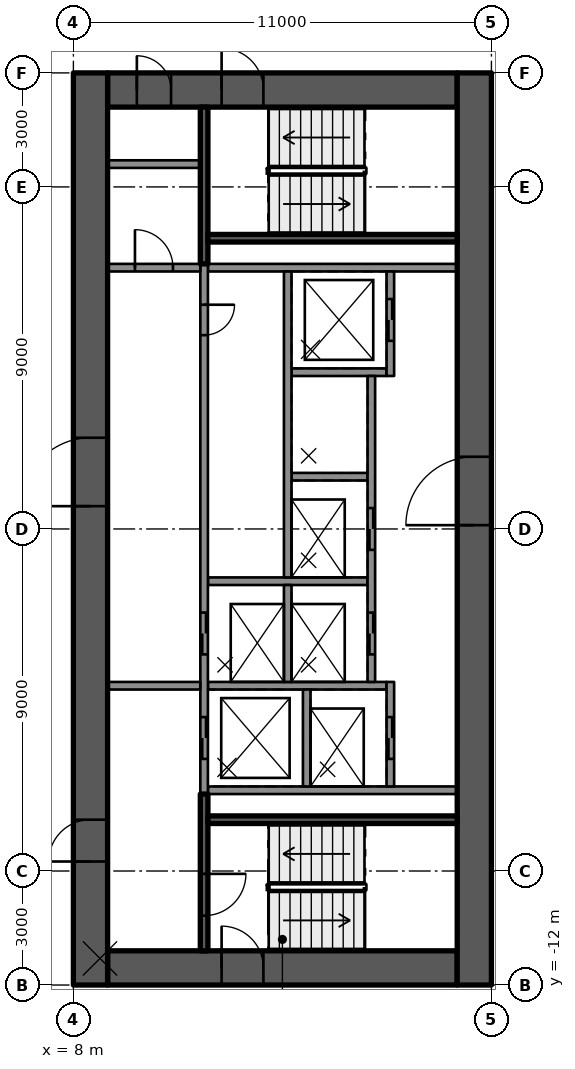
"""IFC4 building model, lengths in metres.
Left out: names, types, materials, properties, quantities, classifications, styles, units other than length and angle.
Written with IfcOpenShell. Run it as: python <this file> out.ifc"""

import sys

from ifc_helpers import new_model, si_unit, direction, frame, frame_2d, origin, place, context, subcontext, project, spatial, rectangle, extrude, element, fill, save


model = new_model("IFC4")
c1 = context("Model", 3, precision=1e-05, world=origin(), true_north=direction((0.0, 1.0)))
c2 = subcontext(c1, "Body", "Model", "MODEL_VIEW")
j1 = project(units=[si_unit("LENGTHUNIT", "METRE"), si_unit("PLANEANGLEUNIT", "RADIAN")], contexts=[c1])
p1 = place(None, origin())
s1 = spatial("IfcSite", under=j1, at=p1, CompositionType="ELEMENT")
p2 = place(p1, origin())
s2 = spatial("IfcBuilding", under=s1, at=p2, CompositionType="ELEMENT")
p3 = place(p2, frame((0.0, 0.0, 152.6)))
s3 = spatial("IfcBuildingStorey", under=s2, at=p3, CompositionType="ELEMENT", Elevation=152.6)
p4 = place(p3, frame((8.9, 11.55, 0.0), z_axis=(0.0, 0.0, 1.0), x_axis=(1.0, 0.0, 0.0)))
e1 = element("IfcWall", 1, at=p4, inside=s3, PredefinedType="SHEAR", context=c2, shape_type="SweptSolid", body=[
    extrude(rectangle(XDim=9.2, YDim=0.9, at=frame_2d((4.6, 0.0))), origin(), (0.0, 0.0, 1.0), 3.5),
])
p5 = place(p4, frame((3.0, 0.0, 0.0)))
e2 = element("IfcOpeningElement", 2, at=p5, cuts=e1, PredefinedType="OPENING", context=c2, shape_type="SweptSolid", body=[
    extrude(rectangle(XDim=1.1, YDim=2.1, at=frame_2d((0.55, 1.05))), frame((0.0, 0.46, 0.0), z_axis=(0.0, -1.0, 0.0), x_axis=(1.0, 0.0, 0.0)), (0.0, 0.0, 1.0), 0.92),
])
p6 = place(p4, frame((0.77, 0.0, 0.0)))
e3 = element("IfcOpeningElement", 3, at=p6, cuts=e1, PredefinedType="OPENING", context=c2, shape_type="SweptSolid", body=[
    extrude(rectangle(XDim=0.9, YDim=2.1, at=frame_2d((0.45, 1.05))), frame((0.0, 0.46, 0.0), z_axis=(0.0, -1.0, 0.0), x_axis=(1.0, 0.0, 0.0)), (0.0, 0.0, 1.0), 0.92),
])
p7 = place(p3, frame((8.9, -11.55, 0.0), z_axis=(0.0, 0.0, 1.0), x_axis=(1.0, 0.0, 0.0)))
e4 = element("IfcWall", 4, at=p7, inside=s3, PredefinedType="SHEAR", context=c2, shape_type="SweptSolid", body=[
    extrude(rectangle(XDim=9.2, YDim=0.9, at=frame_2d((4.6, 0.0))), origin(), (0.0, 0.0, 1.0), 3.5),
])
p8 = place(p7, frame((3.0, 0.0, 0.0)))
e5 = element("IfcOpeningElement", 5, at=p8, cuts=e4, PredefinedType="OPENING", context=c2, shape_type="SweptSolid", body=[
    extrude(rectangle(XDim=1.1, YDim=2.1, at=frame_2d((0.55, 1.05))), frame((0.0, 0.46, 0.0), z_axis=(0.0, -1.0, 0.0), x_axis=(1.0, 0.0, 0.0)), (0.0, 0.0, 1.0), 0.92),
])
p9 = place(p3, frame((8.45, -12.0, 0.0), z_axis=(0.0, 0.0, 1.0), x_axis=(0.0, 1.0, 0.0)))
e6 = element("IfcWall", 6, at=p9, inside=s3, PredefinedType="SHEAR", context=c2, shape_type="SweptSolid", body=[
    extrude(rectangle(XDim=24.0, YDim=0.9, at=frame_2d((12.0, 0.0))), origin(), (0.0, 0.0, 1.0), 3.5),
])
p10 = place(p9, frame((12.6, 0.0, 0.0)))
e7 = element("IfcOpeningElement", 7, at=p10, cuts=e6, PredefinedType="OPENING", context=c2, shape_type="SweptSolid", body=[
    extrude(rectangle(XDim=1.8, YDim=2.1, at=frame_2d((0.9, 1.05))), frame((0.0, 0.46, 0.0), z_axis=(0.0, -1.0, 0.0), x_axis=(1.0, 0.0, 0.0)), (0.0, 0.0, 1.0), 0.92),
])
p11 = place(p9, frame((3.25, 0.0, 0.0)))
e8 = element("IfcOpeningElement", 8, at=p11, cuts=e6, PredefinedType="OPENING", context=c2, shape_type="SweptSolid", body=[
    extrude(rectangle(XDim=1.1, YDim=2.1, at=frame_2d((0.55, 1.05))), frame((0.0, 0.46, 0.0), z_axis=(0.0, -1.0, 0.0), x_axis=(1.0, 0.0, 0.0)), (0.0, 0.0, 1.0), 0.92),
])
p12 = place(p3, frame((18.55, -12.0, 0.0), z_axis=(0.0, 0.0, 1.0), x_axis=(0.0, 1.0, 0.0)))
e9 = element("IfcWall", 9, at=p12, inside=s3, PredefinedType="SHEAR", context=c2, shape_type="SweptSolid", body=[
    extrude(rectangle(XDim=24.0, YDim=0.9, at=frame_2d((12.0, 0.0))), origin(), (0.0, 0.0, 1.0), 3.5),
])
p13 = place(p12, frame((12.1, 0.0, 0.0)))
e10 = element("IfcOpeningElement", 10, at=p13, cuts=e9, PredefinedType="OPENING", context=c2, shape_type="SweptSolid", body=[
    extrude(rectangle(XDim=1.8, YDim=2.1, at=frame_2d((0.9, 1.05))), frame((0.0, 0.46, 0.0), z_axis=(0.0, -1.0, 0.0), x_axis=(1.0, 0.0, 0.0)), (0.0, 0.0, 1.0), 0.92),
])
for number, where, z_axis, x_axis in (
    (11, (11.54, -6.875, 0.0), (0.0, 0.0, 1.0), (1.0, 0.0, 0.0)),
    (12, (11.54, 6.875, 0.0), (0.0, 0.0, 1.0), (1.0, 0.0, 0.0)),
):
    element("IfcWall", number, at=place(p3, frame(where, z_axis=z_axis, x_axis=x_axis)), inside=s3, PredefinedType="SOLIDWALL", context=c2, shape_type="SweptSolid", body=[
        extrude(rectangle(XDim=6.56, YDim=0.2, at=frame_2d((3.28, 0.0))), origin(), (0.0, 0.0, 1.0), 3.09),
    ])
p14 = place(p3, frame((13.74, 4.125, 0.0), z_axis=(0.0, 0.0, 1.0), x_axis=(1.0, 0.0, 0.0)))
e13 = element("IfcWall", 13, at=p14, inside=s3, PredefinedType="SOLIDWALL", context=c2, shape_type="SweptSolid", body=[
    extrude(rectangle(XDim=2.5, YDim=0.2, at=frame_2d((1.25, 0.0))), origin(), (0.0, 0.0, 1.0), 3.09),
])
p15 = place(p3, frame((13.74, 1.375, 0.0), z_axis=(0.0, 0.0, 1.0), x_axis=(1.0, 0.0, 0.0)))
e14 = element("IfcWall", 14, at=p15, inside=s3, PredefinedType="SOLIDWALL", context=c2, shape_type="SweptSolid", body=[
    extrude(rectangle(XDim=2.0, YDim=0.2, at=frame_2d((1.0, 0.0))), origin(), (0.0, 0.0, 1.0), 3.09),
])
p16 = place(p3, frame((11.54, -1.375, 0.0), z_axis=(0.0, 0.0, 1.0), x_axis=(1.0, 0.0, 0.0)))
e15 = element("IfcWall", 15, at=p16, inside=s3, PredefinedType="SOLIDWALL", context=c2, shape_type="SweptSolid", body=[
    extrude(rectangle(XDim=4.2, YDim=0.2, at=frame_2d((2.1, 0.0))), origin(), (0.0, 0.0, 1.0), 3.09),
])
p17 = place(p3, frame((11.54, -4.125, 0.0), z_axis=(0.0, 0.0, 1.0), x_axis=(1.0, 0.0, 0.0)))
e16 = element("IfcWall", 16, at=p17, inside=s3, PredefinedType="SOLIDWALL", context=c2, shape_type="SweptSolid", body=[
    extrude(rectangle(XDim=4.7, YDim=0.2, at=frame_2d((2.35, 0.0))), origin(), (0.0, 0.0, 1.0), 3.09),
])
p18 = place(p3, frame((11.44, 6.975, 0.0), z_axis=(0.0, 0.0, 1.0), x_axis=(0.0, -1.0, 0.0)))
e17 = element("IfcWall", 17, at=p18, inside=s3, PredefinedType="SOLIDWALL", context=c2, shape_type="SweptSolid", body=[
    extrude(rectangle(XDim=13.95, YDim=0.2, at=frame_2d((6.975, 0.0))), origin(), (0.0, 0.0, 1.0), 3.09),
])
p19 = place(p18, frame((9.175, 0.0, 0.0)))
e18 = element("IfcOpeningElement", 18, at=p19, cuts=e17, PredefinedType="OPENING", context=c2, shape_type="SweptSolid", body=[
    extrude(rectangle(XDim=1.1, YDim=2.1, at=frame_2d((0.55, 1.05))), frame((0.0, 0.11, 0.0), z_axis=(0.0, -1.0, 0.0), x_axis=(1.0, 0.0, 0.0)), (0.0, 0.0, 1.0), 0.22),
])
p20 = place(p18, frame((11.925, 0.0, 0.0)))
e19 = element("IfcOpeningElement", 19, at=p20, cuts=e17, PredefinedType="OPENING", context=c2, shape_type="SweptSolid", body=[
    extrude(rectangle(XDim=1.1, YDim=2.1, at=frame_2d((0.55, 1.05))), frame((0.0, 0.11, 0.0), z_axis=(0.0, -1.0, 0.0), x_axis=(1.0, 0.0, 0.0)), (0.0, 0.0, 1.0), 0.22),
])
p21 = place(p18, frame((1.075, 0.0, 0.0)))
e20 = element("IfcOpeningElement", 20, at=p21, cuts=e17, PredefinedType="OPENING", context=c2, shape_type="SweptSolid", body=[
    extrude(rectangle(XDim=0.8, YDim=2.1, at=frame_2d((0.4, 1.05))), frame((0.0, 0.11, 0.0), z_axis=(0.0, -1.0, 0.0), x_axis=(1.0, 0.0, 0.0)), (0.0, 0.0, 1.0), 0.22),
])
p22 = place(p3, frame((13.64, 6.775, 0.0), z_axis=(0.0, 0.0, 1.0), x_axis=(0.0, -1.0, 0.0)))
e21 = element("IfcWall", 21, at=p22, inside=s3, PredefinedType="SOLIDWALL", context=c2, shape_type="SweptSolid", body=[
    extrude(rectangle(XDim=8.05, YDim=0.2, at=frame_2d((4.025, 0.0))), origin(), (0.0, 0.0, 1.0), 3.09),
])
for number, where, z_axis, x_axis in (
    (22, (13.64, -1.475, 0.0), (0.0, 0.0, 1.0), (0.0, -1.0, 0.0)),
    (23, (14.14, -4.225, 0.0), (0.0, 0.0, 1.0), (0.0, -1.0, 0.0)),
):
    element("IfcWall", number, at=place(p3, frame(where, z_axis=z_axis, x_axis=x_axis)), inside=s3, PredefinedType="SOLIDWALL", context=c2, shape_type="SweptSolid", body=[
        extrude(rectangle(XDim=2.55, YDim=0.2, at=frame_2d((1.275, 0.0))), origin(), (0.0, 0.0, 1.0), 3.09),
    ])
p23 = place(p3, frame((16.34, 6.775, 0.0), z_axis=(0.0, 0.0, 1.0), x_axis=(0.0, -1.0, 0.0)))
e24 = element("IfcWall", 24, at=p23, inside=s3, PredefinedType="SOLIDWALL", context=c2, shape_type="SweptSolid", body=[
    extrude(rectangle(XDim=2.75, YDim=0.2, at=frame_2d((1.375, 0.0))), origin(), (0.0, 0.0, 1.0), 3.09),
])
p24 = place(p23, frame((0.725, 0.0, 0.0)))
e25 = element("IfcOpeningElement", 25, at=p24, cuts=e24, PredefinedType="OPENING", context=c2, shape_type="SweptSolid", body=[
    extrude(rectangle(XDim=1.1, YDim=2.1, at=frame_2d((0.55, 1.05))), frame((0.0, 0.11, 0.0), z_axis=(0.0, -1.0, 0.0), x_axis=(1.0, 0.0, 0.0)), (0.0, 0.0, 1.0), 0.22),
])
p25 = place(p3, frame((15.84, 4.025, 0.0), z_axis=(0.0, 0.0, 1.0), x_axis=(0.0, -1.0, 0.0)))
e26 = element("IfcWall", 26, at=p25, inside=s3, PredefinedType="SOLIDWALL", context=c2, shape_type="SweptSolid", body=[
    extrude(rectangle(XDim=8.05, YDim=0.2, at=frame_2d((4.025, 0.0))), origin(), (0.0, 0.0, 1.0), 3.09),
])
p26 = place(p25, frame((3.475, 0.0, 0.0)))
e27 = element("IfcOpeningElement", 27, at=p26, cuts=e26, PredefinedType="OPENING", context=c2, shape_type="SweptSolid", body=[
    extrude(rectangle(XDim=1.1, YDim=2.1, at=frame_2d((0.55, 1.05))), frame((0.0, 0.11, 0.0), z_axis=(0.0, -1.0, 0.0), x_axis=(1.0, 0.0, 0.0)), (0.0, 0.0, 1.0), 0.22),
])
p27 = place(p25, frame((6.225, 0.0, 0.0)))
e28 = element("IfcOpeningElement", 28, at=p27, cuts=e26, PredefinedType="OPENING", context=c2, shape_type="SweptSolid", body=[
    extrude(rectangle(XDim=1.1, YDim=2.1, at=frame_2d((0.55, 1.05))), frame((0.0, 0.11, 0.0), z_axis=(0.0, -1.0, 0.0), x_axis=(1.0, 0.0, 0.0)), (0.0, 0.0, 1.0), 0.22),
])
p28 = place(p3, frame((16.34, -4.025, 0.0), z_axis=(0.0, 0.0, 1.0), x_axis=(0.0, -1.0, 0.0)))
e29 = element("IfcWall", 29, at=p28, inside=s3, PredefinedType="SOLIDWALL", context=c2, shape_type="SweptSolid", body=[
    extrude(rectangle(XDim=2.75, YDim=0.2, at=frame_2d((1.375, 0.0))), origin(), (0.0, 0.0, 1.0), 3.09),
])
p29 = place(p28, frame((0.925, 0.0, 0.0)))
e30 = element("IfcOpeningElement", 30, at=p29, cuts=e29, PredefinedType="OPENING", context=c2, shape_type="SweptSolid", body=[
    extrude(rectangle(XDim=1.1, YDim=2.1, at=frame_2d((0.55, 1.05))), frame((0.0, 0.11, 0.0), z_axis=(0.0, -1.0, 0.0), x_axis=(1.0, 0.0, 0.0)), (0.0, 0.0, 1.0), 0.22),
])
p30 = place(p3, frame((11.44, -6.975, 0.0), z_axis=(0.0, 0.0, 1.0), x_axis=(0.0, -1.0, 0.0)))
e31 = element("IfcWall", 31, at=p30, inside=s3, PredefinedType="SOLIDWALL", context=c2, shape_type="SweptSolid", body=[
    extrude(rectangle(XDim=4.125, YDim=0.2, at=frame_2d((2.062, 0.0))), origin(), (0.0, 0.0, 1.0), 3.09),
])
p31 = place(p30, frame((2.1, 0.0, 0.0)))
e32 = element("IfcOpeningElement", 32, at=p31, cuts=e31, PredefinedType="OPENING", context=c2, shape_type="SweptSolid", body=[
    extrude(rectangle(XDim=1.1, YDim=2.1, at=frame_2d((0.55, 1.05))), frame((0.0, 0.11, 0.0), z_axis=(0.0, -1.0, 0.0), x_axis=(1.0, 0.0, 0.0)), (0.0, 0.0, 1.0), 0.22),
])
p32 = place(p3, frame((11.54, -7.65, 0.0), z_axis=(0.0, 0.0, 1.0), x_axis=(1.0, 0.0, 0.0)))
e33 = element("IfcWall", 33, at=p32, inside=s3, PredefinedType="SOLIDWALL", context=c2, shape_type="SweptSolid", body=[
    extrude(rectangle(XDim=6.56, YDim=0.2, at=frame_2d((3.28, 0.0))), origin(), (0.0, 0.0, 1.0), 3.09),
])
p33 = place(p3, frame((11.44, 11.1, 0.0), z_axis=(0.0, 0.0, 1.0), x_axis=(0.0, -1.0, 0.0)))
e34 = element("IfcWall", 34, at=p33, inside=s3, PredefinedType="SOLIDWALL", context=c2, shape_type="SweptSolid", body=[
    extrude(rectangle(XDim=4.125, YDim=0.2, at=frame_2d((2.062, 0.0))), origin(), (0.0, 0.0, 1.0), 3.09),
])
p34 = place(p3, frame((11.54, 7.65, 0.0), z_axis=(0.0, 0.0, 1.0), x_axis=(1.0, 0.0, 0.0)))
e35 = element("IfcWall", 35, at=p34, inside=s3, PredefinedType="SOLIDWALL", context=c2, shape_type="SweptSolid", body=[
    extrude(rectangle(XDim=6.56, YDim=0.2, at=frame_2d((3.28, 0.0))), origin(), (0.0, 0.0, 1.0), 3.09),
])
p35 = place(p3, frame((8.9, -4.125, 0.0), z_axis=(0.0, 0.0, 1.0), x_axis=(1.0, 0.0, 0.0)))
e36 = element("IfcWall", 36, at=p35, inside=s3, PredefinedType="PARTITIONING", context=c2, shape_type="SweptSolid", body=[
    extrude(rectangle(XDim=2.44, YDim=0.2, at=frame_2d((1.22, 0.0))), origin(), (0.0, 0.0, 1.0), 3.09),
])
p36 = place(p3, frame((8.9, 6.875, 0.0), z_axis=(0.0, 0.0, 1.0), x_axis=(1.0, 0.0, 0.0)))
e37 = element("IfcWall", 37, at=p36, inside=s3, PredefinedType="PARTITIONING", context=c2, shape_type="SweptSolid", body=[
    extrude(rectangle(XDim=2.44, YDim=0.2, at=frame_2d((1.22, 0.0))), origin(), (0.0, 0.0, 1.0), 3.09),
])
p37 = place(p36, frame((0.72, 0.0, 0.0)))
e38 = element("IfcOpeningElement", 38, at=p37, cuts=e37, PredefinedType="OPENING", context=c2, shape_type="SweptSolid", body=[
    extrude(rectangle(XDim=1.0, YDim=2.1, at=frame_2d((0.5, 1.05))), frame((0.0, 0.11, 0.0), z_axis=(0.0, -1.0, 0.0), x_axis=(1.0, 0.0, 0.0)), (0.0, 0.0, 1.0), 0.22),
])
p38 = place(p3, frame((8.9, 9.6, 0.0), z_axis=(0.0, 0.0, 1.0), x_axis=(1.0, 0.0, 0.0)))
e39 = element("IfcWall", 39, at=p38, inside=s3, PredefinedType="PARTITIONING", context=c2, shape_type="SweptSolid", body=[
    extrude(rectangle(XDim=2.44, YDim=0.2, at=frame_2d((1.22, 0.0))), origin(), (0.0, 0.0, 1.0), 3.09),
])
p39 = place(p24, origin())
e40 = element("IfcDoor", 40, at=p39, inside=s3, OperationType="DOUBLE_DOOR_SLIDING", PredefinedType="DOOR", context=c2, shape_type="SweptSolid", body=[
    extrude(rectangle(XDim=1.1, YDim=2.1, at=frame_2d((0.55, 1.05))), frame((0.0, 0.025, 0.0), z_axis=(0.0, -1.0, 0.0), x_axis=(1.0, 0.0, 0.0)), (0.0, 0.0, 1.0), 0.05),
])
fill(e25, e40)
p40 = place(p26, origin())
e41 = element("IfcDoor", 41, at=p40, inside=s3, OperationType="DOUBLE_DOOR_SLIDING", PredefinedType="DOOR", context=c2, shape_type="SweptSolid", body=[
    extrude(rectangle(XDim=1.1, YDim=2.1, at=frame_2d((0.55, 1.05))), frame((0.0, 0.025, 0.0), z_axis=(0.0, -1.0, 0.0), x_axis=(1.0, 0.0, 0.0)), (0.0, 0.0, 1.0), 0.05),
])
fill(e27, e41)
p41 = place(p19, origin())
e42 = element("IfcDoor", 42, at=p41, inside=s3, OperationType="DOUBLE_DOOR_SLIDING", PredefinedType="DOOR", context=c2, shape_type="SweptSolid", body=[
    extrude(rectangle(XDim=1.1, YDim=2.1, at=frame_2d((0.55, 1.05))), frame((0.0, 0.025, 0.0), z_axis=(0.0, -1.0, 0.0), x_axis=(1.0, 0.0, 0.0)), (0.0, 0.0, 1.0), 0.05),
])
fill(e18, e42)
p42 = place(p27, origin())
e43 = element("IfcDoor", 43, at=p42, inside=s3, OperationType="DOUBLE_DOOR_SLIDING", PredefinedType="DOOR", context=c2, shape_type="SweptSolid", body=[
    extrude(rectangle(XDim=1.1, YDim=2.1, at=frame_2d((0.55, 1.05))), frame((0.0, 0.025, 0.0), z_axis=(0.0, -1.0, 0.0), x_axis=(1.0, 0.0, 0.0)), (0.0, 0.0, 1.0), 0.05),
])
fill(e28, e43)
p43 = place(p20, origin())
e44 = element("IfcDoor", 44, at=p43, inside=s3, OperationType="DOUBLE_DOOR_SLIDING", PredefinedType="DOOR", context=c2, shape_type="SweptSolid", body=[
    extrude(rectangle(XDim=1.1, YDim=2.1, at=frame_2d((0.55, 1.05))), frame((0.0, 0.025, 0.0), z_axis=(0.0, -1.0, 0.0), x_axis=(1.0, 0.0, 0.0)), (0.0, 0.0, 1.0), 0.05),
])
fill(e19, e44)
p44 = place(p29, origin())
e45 = element("IfcDoor", 45, at=p44, inside=s3, OperationType="DOUBLE_DOOR_SLIDING", PredefinedType="DOOR", context=c2, shape_type="SweptSolid", body=[
    extrude(rectangle(XDim=1.1, YDim=2.1, at=frame_2d((0.55, 1.05))), frame((0.0, 0.025, 0.0), z_axis=(0.0, -1.0, 0.0), x_axis=(1.0, 0.0, 0.0)), (0.0, 0.0, 1.0), 0.05),
])
fill(e30, e45)
p45 = place(p21, origin())
e46 = element("IfcDoor", 46, at=p45, inside=s3, OperationType="SINGLE_SWING_LEFT", PredefinedType="DOOR", context=c2, shape_type="SweptSolid", body=[
    extrude(rectangle(XDim=0.8, YDim=2.1, at=frame_2d((0.4, 1.05))), frame((0.0, 0.025, 0.0), z_axis=(0.0, -1.0, 0.0), x_axis=(1.0, 0.0, 0.0)), (0.0, 0.0, 1.0), 0.05),
])
fill(e20, e46)
p46 = place(p10, origin())
e47 = element("IfcDoor", 47, at=p46, inside=s3, OperationType="SINGLE_SWING_RIGHT", PredefinedType="DOOR", context=c2, shape_type="SweptSolid", body=[
    extrude(rectangle(XDim=1.8, YDim=2.1, at=frame_2d((0.9, 1.05))), frame((0.0, 0.025, 0.0), z_axis=(0.0, -1.0, 0.0), x_axis=(1.0, 0.0, 0.0)), (0.0, 0.0, 1.0), 0.05),
])
fill(e7, e47)
p47 = place(p13, origin())
e48 = element("IfcDoor", 48, at=p47, inside=s3, OperationType="SINGLE_SWING_RIGHT", PredefinedType="DOOR", context=c2, shape_type="SweptSolid", body=[
    extrude(rectangle(XDim=1.8, YDim=2.1, at=frame_2d((0.9, 1.05))), frame((0.0, 0.025, 0.0), z_axis=(0.0, -1.0, 0.0), x_axis=(1.0, 0.0, 0.0)), (0.0, 0.0, 1.0), 0.05),
])
fill(e10, e48)
p48 = place(p11, origin())
e49 = element("IfcDoor", 49, at=p48, inside=s3, OperationType="SINGLE_SWING_LEFT", PredefinedType="DOOR", context=c2, shape_type="SweptSolid", body=[
    extrude(rectangle(XDim=1.1, YDim=2.1, at=frame_2d((0.55, 1.05))), frame((0.0, 0.025, 0.0), z_axis=(0.0, -1.0, 0.0), x_axis=(1.0, 0.0, 0.0)), (0.0, 0.0, 1.0), 0.05),
])
fill(e8, e49)
p49 = place(p8, origin())
e50 = element("IfcDoor", 50, at=p49, inside=s3, OperationType="SINGLE_SWING_LEFT", PredefinedType="DOOR", context=c2, shape_type="SweptSolid", body=[
    extrude(rectangle(XDim=1.1, YDim=2.1, at=frame_2d((0.55, 1.05))), frame((0.0, 0.025, 0.0), z_axis=(0.0, -1.0, 0.0), x_axis=(1.0, 0.0, 0.0)), (0.0, 0.0, 1.0), 0.05),
])
fill(e5, e50)
p50 = place(p5, origin())
e51 = element("IfcDoor", 51, at=p50, inside=s3, OperationType="SINGLE_SWING_LEFT", PredefinedType="DOOR", context=c2, shape_type="SweptSolid", body=[
    extrude(rectangle(XDim=1.1, YDim=2.1, at=frame_2d((0.55, 1.05))), frame((0.0, 0.025, 0.0), z_axis=(0.0, -1.0, 0.0), x_axis=(1.0, 0.0, 0.0)), (0.0, 0.0, 1.0), 0.05),
])
fill(e2, e51)
p51 = place(p31, origin())
e52 = element("IfcDoor", 52, at=p51, inside=s3, OperationType="SINGLE_SWING_RIGHT", PredefinedType="DOOR", context=c2, shape_type="SweptSolid", body=[
    extrude(rectangle(XDim=1.1, YDim=2.1, at=frame_2d((0.55, 1.05))), frame((0.0, 0.025, 0.0), z_axis=(0.0, -1.0, 0.0), x_axis=(1.0, 0.0, 0.0)), (0.0, 0.0, 1.0), 0.05),
])
fill(e32, e52)
p52 = place(p6, origin())
e53 = element("IfcDoor", 53, at=p52, inside=s3, OperationType="SINGLE_SWING_LEFT", PredefinedType="DOOR", context=c2, shape_type="SweptSolid", body=[
    extrude(rectangle(XDim=0.9, YDim=2.1, at=frame_2d((0.45, 1.05))), frame((0.0, 0.025, 0.0), z_axis=(0.0, -1.0, 0.0), x_axis=(1.0, 0.0, 0.0)), (0.0, 0.0, 1.0), 0.05),
])
fill(e3, e53)
p53 = place(p37, origin())
e54 = element("IfcDoor", 54, at=p53, inside=s3, OperationType="SINGLE_SWING_RIGHT", PredefinedType="DOOR", context=c2, shape_type="SweptSolid", body=[
    extrude(rectangle(XDim=1.0, YDim=2.1, at=frame_2d((0.5, 1.05))), frame((0.0, 0.025, 0.0), z_axis=(0.0, -1.0, 0.0), x_axis=(1.0, 0.0, 0.0)), (0.0, 0.0, 1.0), 0.05),
])
fill(e38, e54)
save(model, sys.argv[1])
